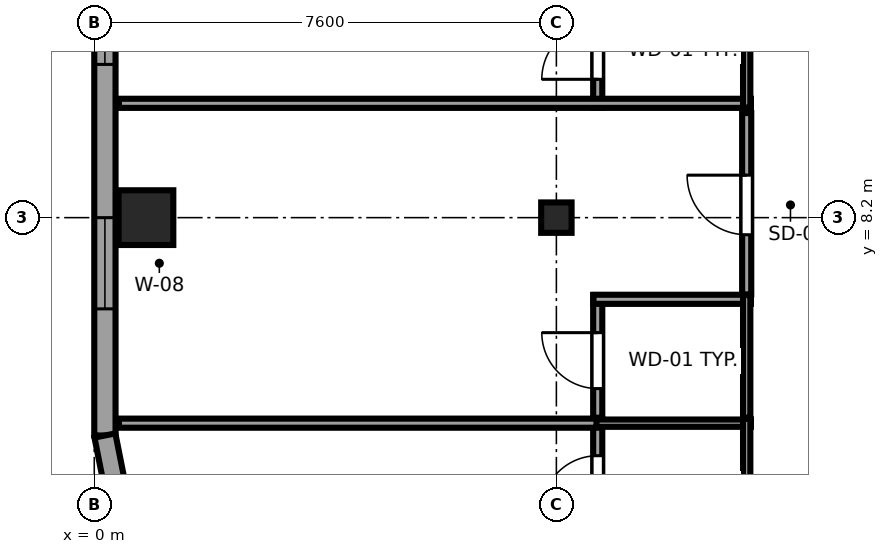
"""IFC4 building model, lengths in metres.
Left out: names, types, materials, properties, quantities, classifications, styles, units other than length and angle.
Written with IfcOpenShell. Run it as: python <this file> out.ifc"""

import sys

from ifc_helpers import new_model, si_unit, direction, frame, frame_2d, origin, origin_2d, place, context, subcontext, project, spatial, rectangle, i_section, extrude, source, transform, mapped, element, fill, save


model = new_model("IFC4")
c1 = context("Model", 3, precision=1e-05, world=origin(), true_north=direction((0.0, 1.0)))
c2 = subcontext(c1, "Body", "Model", "MODEL_VIEW")
j1 = project(units=[si_unit("LENGTHUNIT", "METRE"), si_unit("PLANEANGLEUNIT", "RADIAN")], contexts=[c1])
p1 = place(None, origin())
s1 = spatial("IfcSite", under=j1, at=p1, CompositionType="ELEMENT")
p2 = place(p1, origin())
s2 = spatial("IfcBuilding", under=s1, at=p2, CompositionType="ELEMENT")
p3 = place(p2, frame((0.0, 0.0, 132.85)))
s3 = spatial("IfcBuildingStorey", under=s2, at=p3, CompositionType="ELEMENT", Elevation=132.85)
m1 = source(origin(), c2, "Body", "SweptSolid", [
    extrude(rectangle(XDim=0.9, YDim=0.9, at=origin_2d()), origin(), (0.0, 0.0, 1.0), 3.55),
])
p4 = place(p3, frame((0.85, 8.2, 0.0), z_axis=(0.0, 0.0, 1.0), x_axis=(1.0, 0.0, 0.0)))
e1 = element("IfcColumn", 1, at=p4, inside=s3, PredefinedType="COLUMN", context=c2, shape_type="MappedRepresentation", body=[
    mapped(m1, transform((0.0, 0.0, 0.0), x_axis=(1.0, 0.0, 0.0), y_axis=(0.0, 1.0, 0.0), z_axis=(0.0, 0.0, 1.0), scale=1.0)),
])
m2 = source(origin(), c2, "Body", "SweptSolid", [
    extrude(i_section(OverallWidth=0.5, OverallDepth=0.5, WebThickness=0.022, FlangeThickness=0.034, at=origin_2d()), origin(), (0.0, 0.0, 1.0), 3.55),
])
p5 = place(p3, frame((7.6, 8.2, 0.0), z_axis=(0.0, 0.0, 1.0), x_axis=(1.0, 0.0, 0.0)))
e2 = element("IfcColumn", 2, at=p5, inside=s3, PredefinedType="COLUMN", context=c2, shape_type="MappedRepresentation", body=[
    mapped(m2, transform((0.0, 0.0, 0.0), x_axis=(1.0, 0.0, 0.0), y_axis=(0.0, 1.0, 0.0), z_axis=(0.0, 0.0, 1.0), scale=1.0)),
])
p6 = place(p3, frame((0.175, 41.383, 0.0), z_axis=(0.0, 0.0, 1.0), x_axis=(0.0, -1.0, 0.0)))
e3 = element("IfcWall", 3, at=p6, inside=s3, PredefinedType="SOLIDWALL", context=c2, shape_type="SweptSolid", body=[
    extrude(rectangle(XDim=36.766, YDim=0.35, at=frame_2d((18.383, 0.0))), origin(), (0.0, 0.0, 1.0), 3.37),
])
p7 = place(p6, frame((0.551, 0.0, 0.68)))
e4 = element("IfcOpeningElement", 4, at=p7, cuts=e3, PredefinedType="OPENING", context=c2, shape_type="SweptSolid", body=[
    extrude(rectangle(XDim=1.95, YDim=1.82, at=frame_2d((0.975, 0.91))), frame((0.0, 0.185, 0.0), z_axis=(0.0, -1.0, 0.0), x_axis=(1.0, 0.0, 0.0)), (0.0, 0.0, 1.0), 0.37),
])
p8 = place(p6, frame((9.504, 0.0, 0.68)))
e5 = element("IfcOpeningElement", 5, at=p8, cuts=e3, PredefinedType="OPENING", context=c2, shape_type="SweptSolid", body=[
    extrude(rectangle(XDim=1.95, YDim=1.82, at=frame_2d((0.975, 0.91))), frame((0.0, 0.185, 0.0), z_axis=(0.0, -1.0, 0.0), x_axis=(1.0, 0.0, 0.0)), (0.0, 0.0, 1.0), 0.37),
])
p9 = place(p6, frame((13.456, 0.0, 0.68)))
e6 = element("IfcOpeningElement", 6, at=p9, cuts=e3, PredefinedType="OPENING", context=c2, shape_type="SweptSolid", body=[
    extrude(rectangle(XDim=1.95, YDim=1.82, at=frame_2d((0.975, 0.91))), frame((0.0, 0.185, 0.0), z_axis=(0.0, -1.0, 0.0), x_axis=(1.0, 0.0, 0.0)), (0.0, 0.0, 1.0), 0.37),
])
p10 = place(p6, frame((21.91, 0.0, 0.68)))
e7 = element("IfcOpeningElement", 7, at=p10, cuts=e3, PredefinedType="OPENING", context=c2, shape_type="SweptSolid", body=[
    extrude(rectangle(XDim=1.95, YDim=1.82, at=frame_2d((0.975, 0.91))), frame((0.0, 0.185, 0.0), z_axis=(0.0, -1.0, 0.0), x_axis=(1.0, 0.0, 0.0)), (0.0, 0.0, 1.0), 0.37),
])
p11 = place(p6, frame((28.713, 0.0, 0.68)))
e8 = element("IfcOpeningElement", 8, at=p11, cuts=e3, PredefinedType="OPENING", context=c2, shape_type="SweptSolid", body=[
    extrude(rectangle(XDim=1.95, YDim=1.82, at=frame_2d((0.975, 0.91))), frame((0.0, 0.185, 0.0), z_axis=(0.0, -1.0, 0.0), x_axis=(1.0, 0.0, 0.0)), (0.0, 0.0, 1.0), 0.37),
])
p12 = place(p6, frame((33.183, 0.0, 0.62)))
e9 = element("IfcOpeningElement", 9, at=p12, cuts=e3, PredefinedType="OPENING", context=c2, shape_type="SweptSolid", body=[
    extrude(rectangle(XDim=1.5, YDim=1.55, at=frame_2d((0.75, 0.775))), frame((0.0, 0.185, 0.0), z_axis=(0.0, -1.0, 0.0), x_axis=(1.0, 0.0, 0.0)), (0.0, 0.0, 1.0), 0.37),
])
p13 = place(p3, frame((0.175, 4.617, 0.0), z_axis=(0.0, 0.0, 1.0), x_axis=(0.195011420161, -0.980800971659, 0.0)))
e10 = element("IfcWall", 10, at=p13, inside=s3, PredefinedType="SOLIDWALL", context=c2, shape_type="SweptSolid", body=[
    extrude(rectangle(XDim=1.743, YDim=0.35, at=frame_2d((0.871, 0.0))), origin(), (0.0, 0.0, 1.0), 3.37),
])
p14 = place(p3, frame((8.28, 2.9, 0.0), z_axis=(0.0, 0.0, 1.0), x_axis=(0.0, 1.0, 0.0)))
e11 = element("IfcWall", 11, at=p14, inside=s3, PredefinedType="PARTITIONING", context=c2, shape_type="SweptSolid", body=[
    extrude(rectangle(XDim=1.99, YDim=0.15, at=frame_2d((0.995, 0.0))), origin(), (0.0, 0.0, 1.0), 3.37),
])
p15 = place(p14, frame((0.465, 0.0, 0.0)))
e12 = element("IfcOpeningElement", 12, at=p15, cuts=e11, PredefinedType="OPENING", context=c2, shape_type="SweptSolid", body=[
    extrude(rectangle(XDim=0.92, YDim=2.01, at=frame_2d((0.46, 1.005))), frame((0.0, 0.085, 0.0), z_axis=(0.0, -1.0, 0.0), x_axis=(1.0, 0.0, 0.0)), (0.0, 0.0, 1.0), 0.17),
])
p16 = place(p3, frame((8.21, 4.82, 0.0), z_axis=(0.0, 0.0, 1.0), x_axis=(1.0, 0.0, 0.0)))
e13 = element("IfcWall", 13, at=p16, inside=s3, PredefinedType="PLUMBINGWALL", context=c2, shape_type="SweptSolid", body=[
    extrude(rectangle(XDim=2.59, YDim=0.12, at=frame_2d((1.295, 0.0))), origin(), (0.0, 0.0, 1.0), 3.37),
])
p17 = place(p3, frame((10.73, 2.9, 0.0), z_axis=(0.0, 0.0, 1.0), x_axis=(0.0, 1.0, 0.0)))
e14 = element("IfcWall", 14, at=p17, inside=s3, PredefinedType="PLUMBINGWALL", context=c2, shape_type="SweptSolid", body=[
    extrude(rectangle(XDim=1.99, YDim=0.12, at=frame_2d((0.995, 0.0))), origin(), (0.0, 0.0, 1.0), 3.37),
])
p18 = place(p3, frame((8.28, 4.91, 0.0), z_axis=(0.0, 0.0, 1.0), x_axis=(0.0, 1.0, 0.0)))
e15 = element("IfcWall", 15, at=p18, inside=s3, PredefinedType="PARTITIONING", context=c2, shape_type="SweptSolid", body=[
    extrude(rectangle(XDim=2.017, YDim=0.15, at=frame_2d((1.009, 0.0))), origin(), (0.0, 0.0, 1.0), 3.37),
])
p19 = place(p18, frame((0.479, 0.0, 0.0)))
e16 = element("IfcOpeningElement", 16, at=p19, cuts=e15, PredefinedType="OPENING", context=c2, shape_type="SweptSolid", body=[
    extrude(rectangle(XDim=0.92, YDim=2.01, at=frame_2d((0.46, 1.005))), frame((0.0, 0.085, 0.0), z_axis=(0.0, -1.0, 0.0), x_axis=(1.0, 0.0, 0.0)), (0.0, 0.0, 1.0), 0.17),
])
p20 = place(p3, frame((8.21, 6.857, 0.0), z_axis=(0.0, 0.0, 1.0), x_axis=(1.0, 0.0, 0.0)))
e17 = element("IfcWall", 17, at=p20, inside=s3, PredefinedType="PARTITIONING", context=c2, shape_type="SweptSolid", body=[
    extrude(rectangle(XDim=2.59, YDim=0.15, at=frame_2d((1.295, 0.0))), origin(), (0.0, 0.0, 1.0), 3.37),
])
p21 = place(p3, frame((10.73, 4.91, 0.0), z_axis=(0.0, 0.0, 1.0), x_axis=(0.0, 1.0, 0.0)))
e18 = element("IfcWall", 18, at=p21, inside=s3, PredefinedType="PLUMBINGWALL", context=c2, shape_type="SweptSolid", body=[
    extrude(rectangle(XDim=2.017, YDim=0.12, at=frame_2d((1.009, 0.0))), origin(), (0.0, 0.0, 1.0), 3.37),
])
p22 = place(p3, frame((8.28, 10.01, 0.0), z_axis=(0.0, 0.0, 1.0), x_axis=(0.0, 1.0, 0.0)))
e19 = element("IfcWall", 19, at=p22, inside=s3, PredefinedType="PARTITIONING", context=c2, shape_type="SweptSolid", body=[
    extrude(rectangle(XDim=1.99, YDim=0.15, at=frame_2d((0.995, 0.0))), origin(), (0.0, 0.0, 1.0), 3.37),
])
p23 = place(p22, frame((0.465, 0.0, 0.0)))
e20 = element("IfcOpeningElement", 20, at=p23, cuts=e19, PredefinedType="OPENING", context=c2, shape_type="SweptSolid", body=[
    extrude(rectangle(XDim=0.92, YDim=2.01, at=frame_2d((0.46, 1.005))), frame((0.0, 0.085, 0.0), z_axis=(0.0, -1.0, 0.0), x_axis=(1.0, 0.0, 0.0)), (0.0, 0.0, 1.0), 0.17),
])
p24 = place(p3, frame((0.405, 10.08, 0.0), z_axis=(0.0, 0.0, 1.0), x_axis=(1.0, 0.0, 0.0)))
e21 = element("IfcWall", 21, at=p24, inside=s3, PredefinedType="PARTITIONING", context=c2, shape_type="SweptSolid", body=[
    extrude(rectangle(XDim=10.395, YDim=0.15, at=frame_2d((5.198, 0.0))), origin(), (0.0, 0.0, 1.0), 3.37),
])
p25 = place(p3, frame((10.73, 10.01, 0.0), z_axis=(0.0, 0.0, 1.0), x_axis=(0.0, 1.0, 0.0)))
e22 = element("IfcWall", 22, at=p25, inside=s3, PredefinedType="PLUMBINGWALL", context=c2, shape_type="SweptSolid", body=[
    extrude(rectangle(XDim=1.99, YDim=0.12, at=frame_2d((0.995, 0.0))), origin(), (0.0, 0.0, 1.0), 3.37),
])
p26 = place(p3, frame((0.405, 4.82, 0.0), z_axis=(0.0, 0.0, 1.0), x_axis=(1.0, 0.0, 0.0)))
e23 = element("IfcWall", 23, at=p26, inside=s3, PredefinedType="PARTITIONING", context=c2, shape_type="SweptSolid", body=[
    extrude(rectangle(XDim=7.855, YDim=0.15, at=frame_2d((3.927, 0.0))), origin(), (0.0, 0.0, 1.0), 3.37),
])
p27 = place(p3, frame((10.73, 6.937, 0.0), z_axis=(0.0, 0.0, 1.0), x_axis=(0.0, 1.0, 0.0)))
e24 = element("IfcWall", 24, at=p27, inside=s3, PredefinedType="PARTITIONING", context=c2, shape_type="SweptSolid", body=[
    extrude(rectangle(XDim=2.983, YDim=0.15, at=frame_2d((1.491, 0.0))), origin(), (0.0, 0.0, 1.0), 3.37),
])
p28 = place(p27, frame((0.981, 0.0, 0.0)))
e25 = element("IfcOpeningElement", 25, at=p28, cuts=e24, PredefinedType="OPENING", context=c2, shape_type="SweptSolid", body=[
    extrude(rectangle(XDim=0.98, YDim=2.12, at=frame_2d((0.49, 1.06))), frame((0.0, 0.085, 0.0), z_axis=(0.0, -1.0, 0.0), x_axis=(1.0, 0.0, 0.0)), (0.0, 0.0, 1.0), 0.17),
])
m3 = source(origin(), c2, "Body", "SweptSolid", [
    extrude(rectangle(XDim=1.95, YDim=1.82, at=frame_2d((0.975, 0.91))), frame((0.0, 0.09, 0.0), z_axis=(0.0, -1.0, 0.0), x_axis=(1.0, 0.0, 0.0)), (0.0, 0.0, 1.0), 0.06),
])
p29 = place(p11, origin())
e26 = element("IfcWindow", 26, at=p29, inside=s3, PartitioningType="DOUBLE_PANEL_VERTICAL", PredefinedType="WINDOW", context=c2, shape_type="MappedRepresentation", body=[
    mapped(m3, transform((0.0, 0.0, 0.0), x_axis=(1.0, 0.0, 0.0), y_axis=(0.0, 1.0, 0.0), z_axis=(0.0, 0.0, 1.0), scale=1.0)),
])
fill(e8, e26)
m4 = source(origin(), c2, "Body", "SweptSolid", [
    extrude(rectangle(XDim=1.5, YDim=1.55, at=frame_2d((0.75, 0.775))), frame((0.0, 0.09, 0.0), z_axis=(0.0, -1.0, 0.0), x_axis=(1.0, 0.0, 0.0)), (0.0, 0.0, 1.0), 0.06),
])
p30 = place(p12, origin())
e27 = element("IfcWindow", 27, at=p30, inside=s3, PartitioningType="SINGLE_PANEL", PredefinedType="WINDOW", context=c2, shape_type="MappedRepresentation", body=[
    mapped(m4, transform((0.0, 0.0, 0.0), x_axis=(1.0, 0.0, 0.0), y_axis=(0.0, 1.0, 0.0), z_axis=(0.0, 0.0, 1.0), scale=1.0)),
])
fill(e9, e27)
m5 = source(origin(), c2, "Body", "SweptSolid", [
    extrude(rectangle(XDim=0.92, YDim=2.01, at=frame_2d((0.46, 1.005))), frame((0.0, 0.025, 0.0), z_axis=(0.0, -1.0, 0.0), x_axis=(1.0, 0.0, 0.0)), (0.0, 0.0, 1.0), 0.05),
])
p31 = place(p15, origin())
e28 = element("IfcDoor", 28, at=p31, inside=s3, OperationType="SINGLE_SWING_LEFT", PredefinedType="DOOR", context=c2, shape_type="MappedRepresentation", body=[
    mapped(m5, transform((0.0, 0.0, 0.0), x_axis=(1.0, 0.0, 0.0), y_axis=(0.0, 1.0, 0.0), z_axis=(0.0, 0.0, 1.0), scale=1.0)),
])
fill(e12, e28)
p32 = place(p19, origin())
e29 = element("IfcDoor", 29, at=p32, inside=s3, OperationType="SINGLE_SWING_RIGHT", PredefinedType="DOOR", context=c2, shape_type="MappedRepresentation", body=[
    mapped(m5, transform((0.0, 0.0, 0.0), x_axis=(1.0, 0.0, 0.0), y_axis=(0.0, 1.0, 0.0), z_axis=(0.0, 0.0, 1.0), scale=1.0)),
])
fill(e16, e29)
p33 = place(p23, origin())
e30 = element("IfcDoor", 30, at=p33, inside=s3, OperationType="SINGLE_SWING_LEFT", PredefinedType="DOOR", context=c2, shape_type="MappedRepresentation", body=[
    mapped(m5, transform((0.0, 0.0, 0.0), x_axis=(1.0, 0.0, 0.0), y_axis=(0.0, 1.0, 0.0), z_axis=(0.0, 0.0, 1.0), scale=1.0)),
])
fill(e20, e30)
m6 = source(origin(), c2, "Body", "SweptSolid", [
    extrude(rectangle(XDim=0.98, YDim=2.12, at=frame_2d((0.49, 1.06))), frame((0.0, 0.025, 0.0), z_axis=(0.0, -1.0, 0.0), x_axis=(1.0, 0.0, 0.0)), (0.0, 0.0, 1.0), 0.05),
])
p34 = place(p28, origin())
e31 = element("IfcDoor", 31, at=p34, inside=s3, OperationType="SINGLE_SWING_RIGHT", PredefinedType="DOOR", context=c2, shape_type="MappedRepresentation", body=[
    mapped(m6, transform((0.0, 0.0, 0.0), x_axis=(1.0, 0.0, 0.0), y_axis=(0.0, 1.0, 0.0), z_axis=(0.0, 0.0, 1.0), scale=1.0)),
])
fill(e25, e31)
save(model, sys.argv[1])
